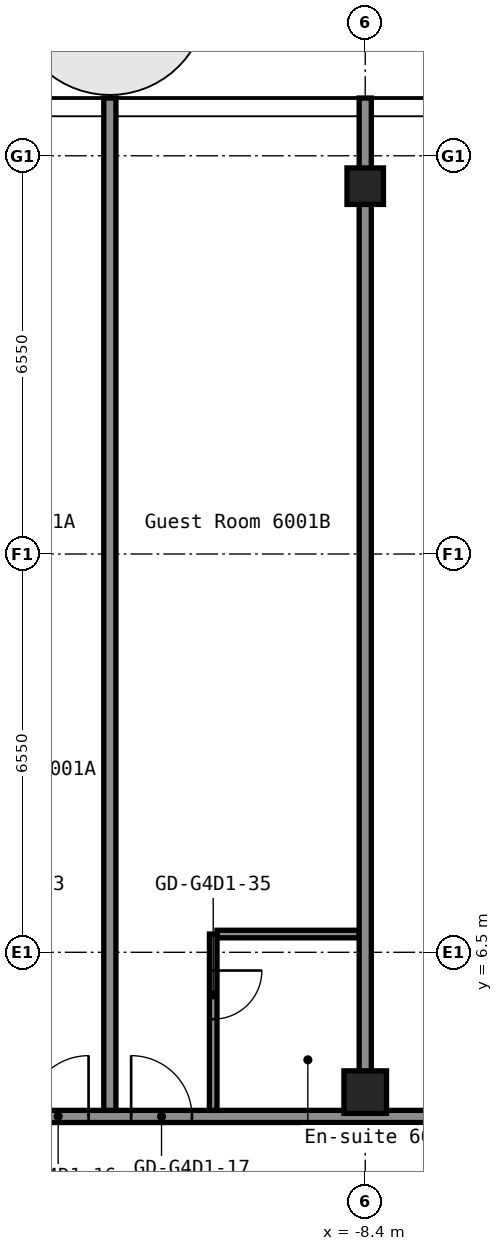
"""IFC4 building model, lengths in metres.
Left out: names, types, materials, properties, quantities, classifications, styles, units other than length and angle.
Written with IfcOpenShell. Run it as: python <this file> out.ifc"""

import sys

from ifc_helpers import new_model, si_unit, direction, frame, frame_2d, origin, origin_2d, place, context, subcontext, project, spatial, rectangle, hollow_rectangle, extrude, element, fill, save


model = new_model("IFC4")
c1 = context("Model", 3, precision=1e-05, world=origin(), true_north=direction((0.0, 1.0)))
c2 = subcontext(c1, "Body", "Model", "MODEL_VIEW")
j1 = project(units=[si_unit("LENGTHUNIT", "METRE"), si_unit("PLANEANGLEUNIT", "RADIAN")], contexts=[c1])
p1 = place(None, origin())
s1 = spatial("IfcSite", under=j1, at=p1, CompositionType="ELEMENT")
p2 = place(p1, origin())
s2 = spatial("IfcBuilding", under=s1, at=p2, CompositionType="ELEMENT")
p3 = place(p2, frame((0.0, 0.0, 212.2)))
s3 = spatial("IfcBuildingStorey", under=s2, at=p3, CompositionType="ELEMENT", Elevation=212.2)
p4 = place(p3, frame((-8.4, 4.2, 0.0), z_axis=(0.0, 0.0, 1.0), x_axis=(1.0, 0.0, 0.0)))
e1 = element("IfcColumn", 1, at=p4, inside=s3, PredefinedType="COLUMN", context=c2, shape_type="SweptSolid", body=[
    extrude(hollow_rectangle(XDim=0.7, YDim=0.7, WallThickness=0.028, at=origin_2d()), origin(), (0.0, 0.0, 1.0), 2.75),
])
p5 = place(p3, frame((-8.4, 19.1, 0.0), z_axis=(0.0, 0.0, 1.0), x_axis=(1.0, 0.0, 0.0)))
e2 = element("IfcColumn", 2, at=p5, inside=s3, PredefinedType="COLUMN", context=c2, shape_type="SweptSolid", body=[
    extrude(hollow_rectangle(XDim=0.6, YDim=0.6, WallThickness=0.025, InnerFilletRadius=0.038, OuterFilletRadius=0.062, at=origin_2d()), origin(), (0.0, 0.0, 1.0), 2.75),
])
p6 = place(p3, frame((-16.8, 3.8, 0.0), z_axis=(0.0, 0.0, 1.0), x_axis=(1.0, 0.0, 0.0)))
e3 = element("IfcWall", 3, at=p6, inside=s3, PredefinedType="PARTITIONING", context=c2, shape_type="SweptSolid", body=[
    extrude(rectangle(XDim=33.6, YDim=0.2, at=frame_2d((16.8, 0.0))), origin(), (0.0, 0.0, 1.0), 2.75),
])
p7 = place(p6, frame((2.85, 0.0, 0.0)))
e4 = element("IfcOpeningElement", 4, at=p7, cuts=e3, PredefinedType="OPENING", context=c2, shape_type="SweptSolid", body=[
    extrude(rectangle(XDim=1.0, YDim=2.1, at=frame_2d((0.5, 1.05))), frame((0.0, 0.11, 0.0), z_axis=(0.0, -1.0, 0.0), x_axis=(1.0, 0.0, 0.0)), (0.0, 0.0, 1.0), 0.22),
])
p8 = place(p6, frame((4.55, 0.0, 0.0)))
e5 = element("IfcOpeningElement", 5, at=p8, cuts=e3, PredefinedType="OPENING", context=c2, shape_type="SweptSolid", body=[
    extrude(rectangle(XDim=1.0, YDim=2.1, at=frame_2d((0.5, 1.05))), frame((0.0, 0.11, 0.0), z_axis=(0.0, -1.0, 0.0), x_axis=(1.0, 0.0, 0.0)), (0.0, 0.0, 1.0), 0.22),
])
p9 = place(p6, frame((10.4, 0.0, 0.0)))
e6 = element("IfcOpeningElement", 6, at=p9, cuts=e3, PredefinedType="OPENING", context=c2, shape_type="SweptSolid", body=[
    extrude(rectangle(XDim=1.0, YDim=2.1, at=frame_2d((0.5, 1.05))), frame((0.0, 0.11, 0.0), z_axis=(0.0, -1.0, 0.0), x_axis=(1.0, 0.0, 0.0)), (0.0, 0.0, 1.0), 0.22),
])
p10 = place(p6, frame((19.65, 0.0, 0.0)))
e7 = element("IfcOpeningElement", 7, at=p10, cuts=e3, PredefinedType="OPENING", context=c2, shape_type="SweptSolid", body=[
    extrude(rectangle(XDim=1.0, YDim=2.1, at=frame_2d((0.5, 1.05))), frame((0.0, 0.11, 0.0), z_axis=(0.0, -1.0, 0.0), x_axis=(1.0, 0.0, 0.0)), (0.0, 0.0, 1.0), 0.22),
])
p11 = place(p6, frame((21.35, 0.0, 0.0)))
e8 = element("IfcOpeningElement", 8, at=p11, cuts=e3, PredefinedType="OPENING", context=c2, shape_type="SweptSolid", body=[
    extrude(rectangle(XDim=1.0, YDim=2.1, at=frame_2d((0.5, 1.05))), frame((0.0, 0.11, 0.0), z_axis=(0.0, -1.0, 0.0), x_axis=(1.0, 0.0, 0.0)), (0.0, 0.0, 1.0), 0.22),
])
p12 = place(p6, frame((27.2, 0.0, 0.0)))
e9 = element("IfcOpeningElement", 9, at=p12, cuts=e3, PredefinedType="OPENING", context=c2, shape_type="SweptSolid", body=[
    extrude(rectangle(XDim=1.0, YDim=2.1, at=frame_2d((0.5, 1.05))), frame((0.0, 0.11, 0.0), z_axis=(0.0, -1.0, 0.0), x_axis=(1.0, 0.0, 0.0)), (0.0, 0.0, 1.0), 0.22),
])
p13 = place(p3, frame((-10.837, 6.8, 0.0), z_axis=(0.0, 0.0, 1.0), x_axis=(1.0, 0.0, 0.0)))
e10 = element("IfcWall", 10, at=p13, inside=s3, PredefinedType="PARTITIONING", context=c2, shape_type="SweptSolid", body=[
    extrude(rectangle(XDim=2.337, YDim=0.125, at=frame_2d((1.169, 0.0))), origin(), (0.0, 0.0, 1.0), 2.75),
])
p14 = place(p3, frame((-12.6, 3.9, 0.0), z_axis=(0.0, 0.0, 1.0), x_axis=(0.0, 1.0, 0.0)))
e11 = element("IfcWall", 11, at=p14, inside=s3, PredefinedType="PARTITIONING", context=c2, shape_type="SweptSolid", body=[
    extrude(rectangle(XDim=16.65, YDim=0.2, at=frame_2d((8.325, 0.0))), origin(), (0.0, 0.0, 1.0), 2.75),
])
p15 = place(p3, frame((-10.9, 3.9, 0.0), z_axis=(0.0, 0.0, 1.0), x_axis=(0.0, 1.0, 0.0)))
e12 = element("IfcWall", 12, at=p15, inside=s3, PredefinedType="PARTITIONING", context=c2, shape_type="SweptSolid", body=[
    extrude(rectangle(XDim=2.9, YDim=0.125, at=frame_2d((1.45, 0.0))), origin(), (0.0, 0.0, 1.0), 2.75),
])
p16 = place(p15, frame((1.5, 0.0, 0.0)))
e13 = element("IfcOpeningElement", 13, at=p16, cuts=e12, PredefinedType="OPENING", context=c2, shape_type="SweptSolid", body=[
    extrude(rectangle(XDim=0.8, YDim=2.1, at=frame_2d((0.4, 1.05))), frame((0.0, 0.073, 0.0), z_axis=(0.0, -1.0, 0.0), x_axis=(1.0, 0.0, 0.0)), (0.0, 0.0, 1.0), 0.145),
])
p17 = place(p3, frame((-8.4, 4.54, 0.0), z_axis=(0.0, 0.0, 1.0), x_axis=(0.0, 1.0, 0.0)))
e14 = element("IfcWall", 14, at=p17, inside=s3, PredefinedType="PARTITIONING", context=c2, shape_type="SweptSolid", body=[
    extrude(rectangle(XDim=16.01, YDim=0.2, at=frame_2d((8.005, 0.0))), origin(), (0.0, 0.0, 1.0), 2.75),
])
p18 = place(p7, origin())
e15 = element("IfcDoor", 15, at=p18, inside=s3, OperationType="SINGLE_SWING_LEFT", PredefinedType="DOOR", context=c2, shape_type="SweptSolid", body=[
    extrude(rectangle(XDim=1.0, YDim=2.1, at=frame_2d((0.5, 1.05))), frame((0.0, 0.025, 0.0), z_axis=(0.0, -1.0, 0.0), x_axis=(1.0, 0.0, 0.0)), (0.0, 0.0, 1.0), 0.05),
])
fill(e4, e15)
p19 = place(p8, origin())
e16 = element("IfcDoor", 16, at=p19, inside=s3, OperationType="SINGLE_SWING_RIGHT", PredefinedType="DOOR", context=c2, shape_type="SweptSolid", body=[
    extrude(rectangle(XDim=1.0, YDim=2.1, at=frame_2d((0.5, 1.05))), frame((0.0, 0.025, 0.0), z_axis=(0.0, -1.0, 0.0), x_axis=(1.0, 0.0, 0.0)), (0.0, 0.0, 1.0), 0.05),
])
fill(e5, e16)
p20 = place(p16, origin())
e17 = element("IfcDoor", 17, at=p20, inside=s3, OperationType="SINGLE_SWING_RIGHT", PredefinedType="DOOR", context=c2, shape_type="SweptSolid", body=[
    extrude(rectangle(XDim=0.8, YDim=2.1, at=frame_2d((0.4, 1.05))), frame((0.0, 0.025, 0.0), z_axis=(0.0, -1.0, 0.0), x_axis=(1.0, 0.0, 0.0)), (0.0, 0.0, 1.0), 0.05),
])
fill(e13, e17)
save(model, sys.argv[1])
